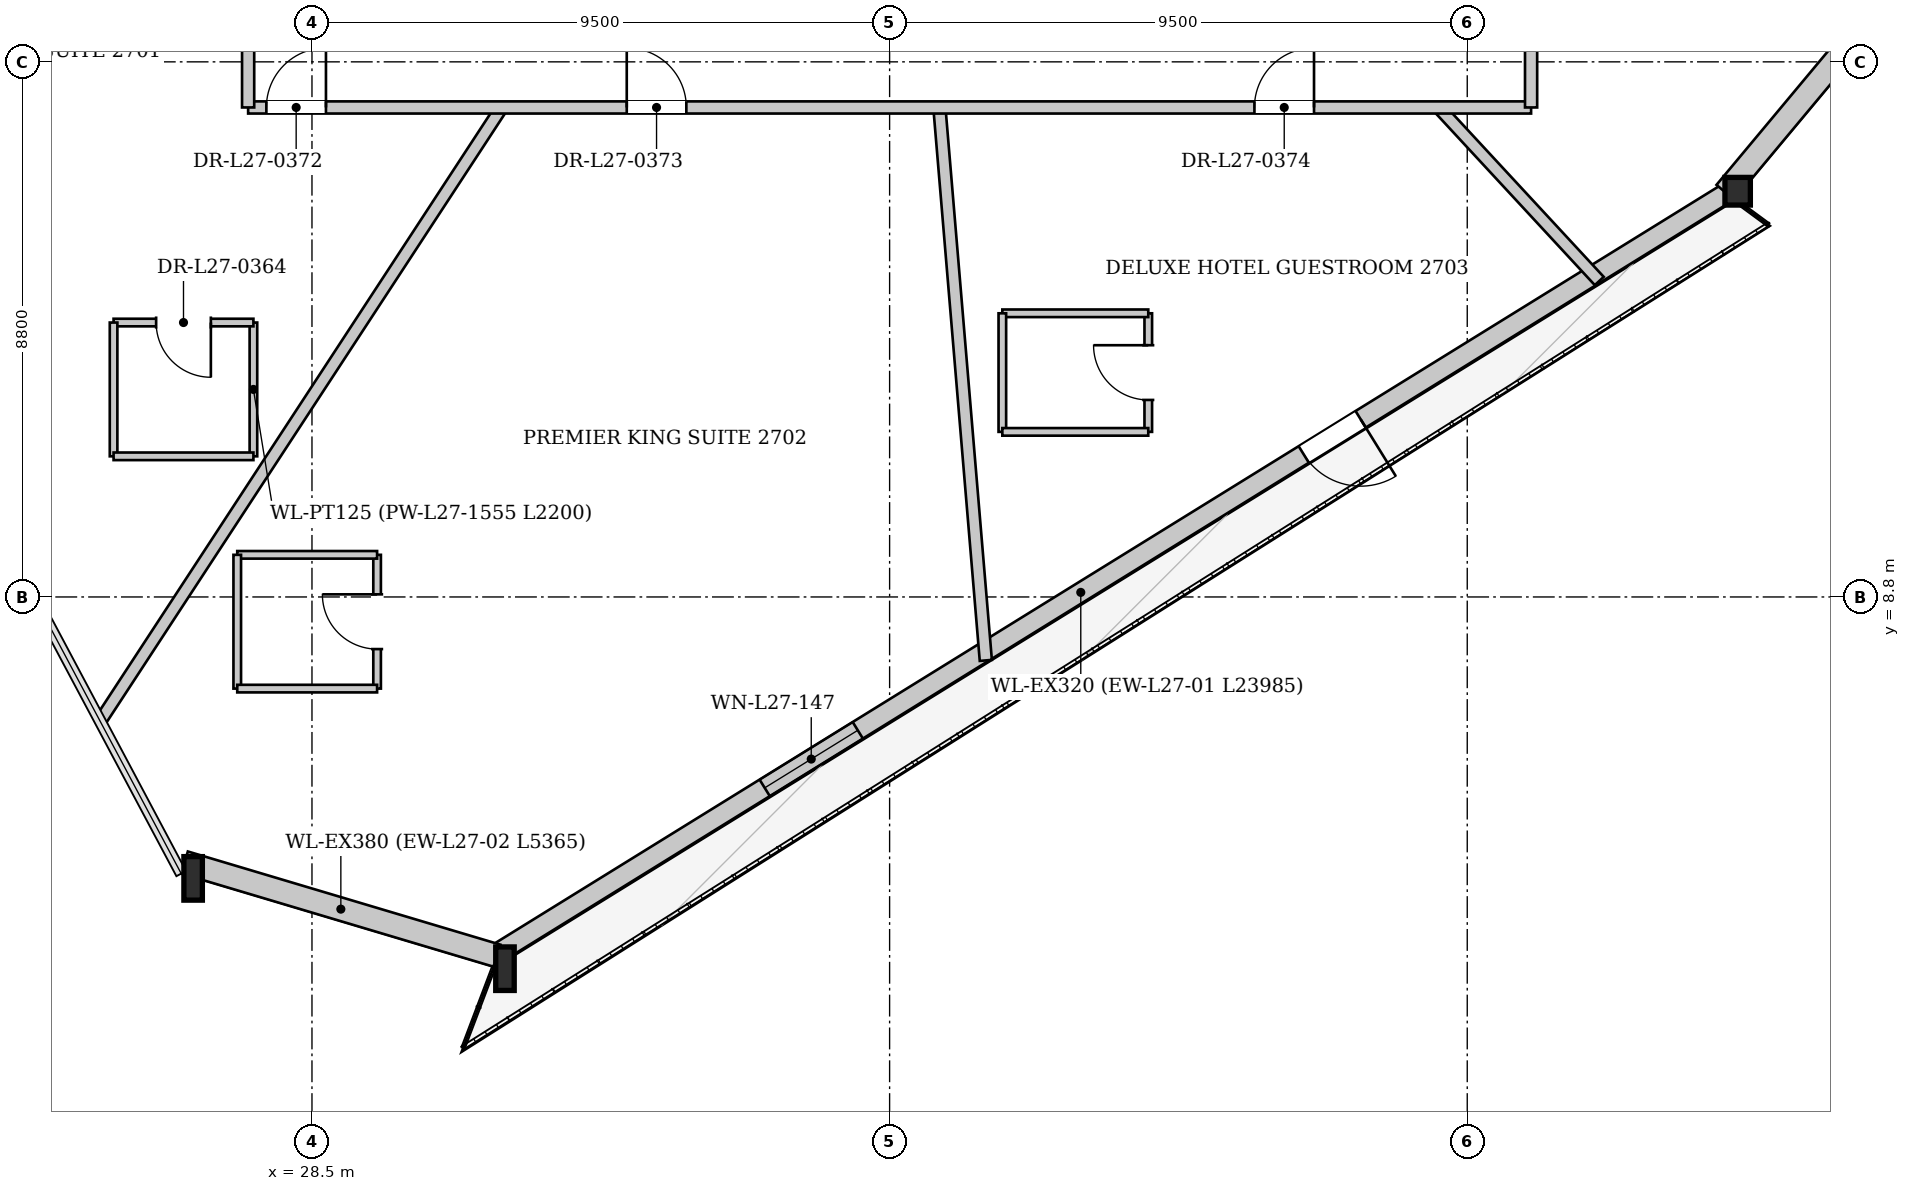
"""IFC4 building model, lengths in metres.
Left out: names, types, materials, properties, quantities, classifications, styles, units other than length and angle.
Written with IfcOpenShell. Run it as: python <this file> out.ifc"""

import sys

from ifc_helpers import new_model, si_unit, direction, frame, frame_2d, origin, origin_2d, place, context, subcontext, project, spatial, rectangle, i_section, extrude, source, transform, mapped, element, fill, save


model = new_model("IFC4")
c1 = context("Model", 3, precision=1e-05, world=origin(), true_north=direction((0.0, 1.0)))
c2 = subcontext(c1, "Body", "Model", "MODEL_VIEW")
j1 = project(units=[si_unit("LENGTHUNIT", "METRE"), si_unit("PLANEANGLEUNIT", "RADIAN")], contexts=[c1])
p1 = place(None, origin())
s1 = spatial("IfcSite", under=j1, at=p1, CompositionType="ELEMENT")
p2 = place(p1, origin())
s2 = spatial("IfcBuilding", under=s1, at=p2, CompositionType="ELEMENT")
p3 = place(p2, frame((0.0, 0.0, 105.7)))
s3 = spatial("IfcBuildingStorey", under=s2, at=p3, CompositionType="ELEMENT", Elevation=105.7)
m1 = source(origin(), c2, "Body", "SweptSolid", [
    extrude(i_section(OverallWidth=0.304, OverallDepth=0.716, WebThickness=0.021, FlangeThickness=0.04, at=origin_2d()), origin(), (0.0, 0.0, 1.0), 3.411),
])
p4 = place(p3, frame((26.35, 4.25, 0.0), z_axis=(0.114728514491, -0.045948662697, 0.992333657778), x_axis=(0.371790029716, 0.928316849898, 0.0)))
e1 = element("IfcColumn", 1, at=p4, inside=s3, PredefinedType="COLUMN", context=c2, shape_type="MappedRepresentation", body=[
    mapped(m1, transform((0.0, 0.0, 0.0), x_axis=(1.0, 0.0, 0.0), y_axis=(0.0, 1.0, 0.0), z_axis=(0.0, 0.0, 1.0), scale=1.0)),
])
m2 = source(origin(), c2, "Body", "SweptSolid", [
    extrude(i_section(OverallWidth=0.304, OverallDepth=0.716, WebThickness=0.021, FlangeThickness=0.04, at=origin_2d()), origin(), (0.0, 0.0, 1.0), 3.405),
])
p5 = place(p3, frame((31.491, 2.718, 0.0), z_axis=(0.107328170064, -0.018138962609, 0.994058168291), x_axis=(0.166641574591, 0.98601753819, 0.0)))
e2 = element("IfcColumn", 2, at=p5, inside=s3, PredefinedType="COLUMN", context=c2, shape_type="MappedRepresentation", body=[
    mapped(m2, transform((0.0, 0.0, 0.0), x_axis=(1.0, 0.0, 0.0), y_axis=(0.0, 1.0, 0.0), z_axis=(0.0, 0.0, 1.0), scale=1.0)),
])
m3 = source(origin(), c2, "Body", "SweptSolid", [
    extrude(i_section(OverallWidth=0.418, OverallDepth=0.455, WebThickness=0.038, FlangeThickness=0.059, at=origin_2d()), origin(), (0.0, 0.0, 1.0), 3.398),
])
p6 = place(p3, frame((51.891, 15.333, 0.0), z_axis=(0.033119577524, 0.08175722174, 0.996101827264), x_axis=(-0.926838869798, 0.375459331263, 0.0)))
e3 = element("IfcColumn", 3, at=p6, inside=s3, PredefinedType="COLUMN", context=c2, shape_type="MappedRepresentation", body=[
    mapped(m3, transform((0.0, 0.0, 0.0), x_axis=(1.0, 0.0, 0.0), y_axis=(0.0, 1.0, 0.0), z_axis=(0.0, 0.0, 1.0), scale=1.0)),
])
p7 = place(p3, frame((51.807, 15.469, 0.0), z_axis=(0.0, 0.0, 1.0), x_axis=(-0.85050085658, -0.525973661847, 0.0)))
e4 = element("IfcWall", 4, at=p7, inside=s3, PredefinedType="SOLIDWALL", context=c2, shape_type="SweptSolid", body=[
    extrude(rectangle(XDim=23.985, YDim=0.32, at=frame_2d((11.993, 0.0))), origin(), (0.0, 0.0, 1.0), 2.692),
])
p8 = place(p7, frame((7.125, 0.0, 0.0)))
e5 = element("IfcOpeningElement", 5, at=p8, cuts=e4, PredefinedType="OPENING", context=c2, shape_type="SweptSolid", body=[
    extrude(rectangle(XDim=1.1, YDim=2.3, at=frame_2d((0.55, 1.15))), frame((0.0, 0.17, 0.0), z_axis=(0.0, -1.0, 0.0), x_axis=(1.0, 0.0, 0.0)), (0.0, 0.0, 1.0), 0.34),
])
p9 = place(p7, frame((16.849, 0.0, 0.372)))
e6 = element("IfcOpeningElement", 6, at=p9, cuts=e4, PredefinedType="OPENING", context=c2, shape_type="SweptSolid", body=[
    extrude(rectangle(XDim=1.8, YDim=2.2, at=frame_2d((0.9, 1.1))), frame((0.0, 0.17, 0.0), z_axis=(0.0, -1.0, 0.0), x_axis=(1.0, 0.0, 0.0)), (0.0, 0.0, 1.0), 0.34),
])
p10 = place(p3, frame((31.546, 2.9, 0.0), z_axis=(0.0, 0.0, 1.0), x_axis=(-0.95832579707, 0.28567755717, 0.0)))
e7 = element("IfcWall", 7, at=p10, inside=s3, PredefinedType="SOLIDWALL", context=c2, shape_type="SweptSolid", body=[
    extrude(rectangle(XDim=5.365, YDim=0.38, at=frame_2d((2.683, 0.0))), origin(), (0.0, 0.0, 1.0), 2.692),
])
p11 = place(p3, frame((67.109, 33.873, 0.0), z_axis=(0.0, 0.0, 1.0), x_axis=(-0.640571779822, -0.767898297234, 0.0)))
e8 = element("IfcWall", 8, at=p11, inside=s3, PredefinedType="SOLIDWALL", context=c2, shape_type="SweptSolid", body=[
    extrude(rectangle(XDim=23.985, YDim=0.38, at=frame_2d((11.993, 0.0))), origin(), (0.0, 0.0, 1.0), 2.692),
])
p12 = place(p11, frame((5.616, 0.0, 0.322)))
e9 = element("IfcOpeningElement", 9, at=p12, cuts=e8, PredefinedType="OPENING", context=c2, shape_type="SweptSolid", body=[
    extrude(rectangle(XDim=2.2, YDim=2.25, at=frame_2d((1.1, 1.125))), frame((0.0, 0.2, 0.0), z_axis=(0.0, -1.0, 0.0), x_axis=(1.0, 0.0, 0.0)), (0.0, 0.0, 1.0), 0.4),
])
p13 = place(p11, frame((16.169, 0.0, 0.322)))
e10 = element("IfcOpeningElement", 10, at=p13, cuts=e8, PredefinedType="OPENING", context=c2, shape_type="SweptSolid", body=[
    extrude(rectangle(XDim=2.2, YDim=2.25, at=frame_2d((1.1, 1.125))), frame((0.0, 0.2, 0.0), z_axis=(0.0, -1.0, 0.0), x_axis=(1.0, 0.0, 0.0)), (0.0, 0.0, 1.0), 0.4),
])
p14 = place(p3, frame((31.62, 16.85, 0.0), z_axis=(0.0, 0.0, 1.0), x_axis=(-0.547573647932, -0.836757491804, 0.0)))
e11 = element("IfcWall", 11, at=p14, inside=s3, PredefinedType="PARTITIONING", context=c2, shape_type="SweptSolid", body=[
    extrude(rectangle(XDim=12.027, YDim=0.2, at=frame_2d((6.014, 0.0))), origin(), (0.0, 0.0, 1.0), 3.3),
])
p15 = place(p3, frame((38.819, 16.85, 0.0), z_axis=(0.0, 0.0, 1.0), x_axis=(0.083685335616, -0.996492230077, 0.0)))
e12 = element("IfcWall", 12, at=p15, inside=s3, PredefinedType="PARTITIONING", context=c2, shape_type="SweptSolid", body=[
    extrude(rectangle(XDim=9.125, YDim=0.2, at=frame_2d((4.563, 0.0))), origin(), (0.0, 0.0, 1.0), 3.3),
])
p16 = place(p3, frame((47.029, 16.85, 0.0), z_axis=(0.0, 0.0, 1.0), x_axis=(0.679439321048, -0.733731700974, 0.0)))
e13 = element("IfcWall", 13, at=p16, inside=s3, PredefinedType="PARTITIONING", context=c2, shape_type="SweptSolid", body=[
    extrude(rectangle(XDim=3.89, YDim=0.2, at=frame_2d((1.945, 0.0))), origin(), (0.0, 0.0, 1.0), 3.3),
])
p17 = place(p3, frame((27.537, 11.113, 0.0), z_axis=(0.0, 0.0, 1.0), x_axis=(0.0, 1.0, 0.0)))
e14 = element("IfcWall", 14, at=p17, inside=s3, PredefinedType="PARTITIONING", context=c2, shape_type="SweptSolid", body=[
    extrude(rectangle(XDim=2.2, YDim=0.125, at=frame_2d((1.1, 0.0))), origin(), (0.0, 0.0, 1.0), 3.3),
])
p18 = place(p3, frame((27.537, 13.313, 0.0), z_axis=(0.0, 0.0, 1.0), x_axis=(-1.0, 0.0, 0.0)))
e15 = element("IfcWall", 15, at=p18, inside=s3, PredefinedType="PARTITIONING", context=c2, shape_type="SweptSolid", body=[
    extrude(rectangle(XDim=2.3, YDim=0.125, at=frame_2d((1.15, 0.0))), origin(), (0.0, 0.0, 1.0), 3.3),
])
p19 = place(p18, frame((0.7, 0.0, 0.0)))
e16 = element("IfcOpeningElement", 16, at=p19, cuts=e15, PredefinedType="OPENING", context=c2, shape_type="SweptSolid", body=[
    extrude(rectangle(XDim=0.9, YDim=2.1, at=frame_2d((0.45, 1.05))), frame((0.0, 0.073, 0.0), z_axis=(0.0, -1.0, 0.0), x_axis=(1.0, 0.0, 0.0)), (0.0, 0.0, 1.0), 0.145),
])
p20 = place(p3, frame((25.237, 13.313, 0.0), z_axis=(0.0, 0.0, 1.0), x_axis=(0.0, -1.0, 0.0)))
e17 = element("IfcWall", 17, at=p20, inside=s3, PredefinedType="PARTITIONING", context=c2, shape_type="SweptSolid", body=[
    extrude(rectangle(XDim=2.2, YDim=0.125, at=frame_2d((1.1, 0.0))), origin(), (0.0, 0.0, 1.0), 3.3),
])
p21 = place(p3, frame((25.237, 11.113, 0.0), z_axis=(0.0, 0.0, 1.0), x_axis=(1.0, 0.0, 0.0)))
e18 = element("IfcWall", 18, at=p21, inside=s3, PredefinedType="PARTITIONING", context=c2, shape_type="SweptSolid", body=[
    extrude(rectangle(XDim=2.3, YDim=0.125, at=frame_2d((1.15, 0.0))), origin(), (0.0, 0.0, 1.0), 3.3),
])
p22 = place(p3, frame((29.571, 7.293, 0.0), z_axis=(0.0, 0.0, 1.0), x_axis=(0.0, 1.0, 0.0)))
e19 = element("IfcWall", 19, at=p22, inside=s3, PredefinedType="PARTITIONING", context=c2, shape_type="SweptSolid", body=[
    extrude(rectangle(XDim=2.2, YDim=0.125, at=frame_2d((1.1, 0.0))), origin(), (0.0, 0.0, 1.0), 2.795),
])
p23 = place(p22, frame((0.65, 0.0, 0.0)))
e20 = element("IfcOpeningElement", 20, at=p23, cuts=e19, PredefinedType="OPENING", context=c2, shape_type="SweptSolid", body=[
    extrude(rectangle(XDim=0.9, YDim=2.1, at=frame_2d((0.45, 1.05))), frame((0.0, 0.073, 0.0), z_axis=(0.0, -1.0, 0.0), x_axis=(1.0, 0.0, 0.0)), (0.0, 0.0, 1.0), 0.145),
])
p24 = place(p3, frame((29.571, 9.493, 0.0), z_axis=(0.0, 0.0, 1.0), x_axis=(-1.0, 0.0, 0.0)))
e21 = element("IfcWall", 21, at=p24, inside=s3, PredefinedType="PARTITIONING", context=c2, shape_type="SweptSolid", body=[
    extrude(rectangle(XDim=2.3, YDim=0.125, at=frame_2d((1.15, 0.0))), origin(), (0.0, 0.0, 1.0), 3.3),
])
p25 = place(p3, frame((27.271, 9.493, 0.0), z_axis=(0.0, 0.0, 1.0), x_axis=(0.0, -1.0, 0.0)))
e22 = element("IfcWall", 22, at=p25, inside=s3, PredefinedType="PARTITIONING", context=c2, shape_type="SweptSolid", body=[
    extrude(rectangle(XDim=2.2, YDim=0.125, at=frame_2d((1.1, 0.0))), origin(), (0.0, 0.0, 1.0), 3.3),
])
p26 = place(p3, frame((27.271, 7.293, 0.0), z_axis=(0.0, 0.0, 1.0), x_axis=(1.0, 0.0, 0.0)))
e23 = element("IfcWall", 23, at=p26, inside=s3, PredefinedType="PARTITIONING", context=c2, shape_type="SweptSolid", body=[
    extrude(rectangle(XDim=2.3, YDim=0.125, at=frame_2d((1.15, 0.0))), origin(), (0.0, 0.0, 1.0), 3.3),
])
p27 = place(p3, frame((42.254, 11.515, 0.0), z_axis=(0.0, 0.0, 1.0), x_axis=(0.0, 1.0, 0.0)))
e24 = element("IfcWall", 24, at=p27, inside=s3, PredefinedType="PARTITIONING", context=c2, shape_type="SweptSolid", body=[
    extrude(rectangle(XDim=1.95, YDim=0.125, at=frame_2d((0.975, 0.0))), origin(), (0.0, 0.0, 1.0), 3.3),
])
p28 = place(p27, frame((0.525, 0.0, 0.0)))
e25 = element("IfcOpeningElement", 25, at=p28, cuts=e24, PredefinedType="OPENING", context=c2, shape_type="SweptSolid", body=[
    extrude(rectangle(XDim=0.9, YDim=2.1, at=frame_2d((0.45, 1.05))), frame((0.0, 0.073, 0.0), z_axis=(0.0, -1.0, 0.0), x_axis=(1.0, 0.0, 0.0)), (0.0, 0.0, 1.0), 0.145),
])
p29 = place(p3, frame((42.254, 13.465, 0.0), z_axis=(0.0, 0.0, 1.0), x_axis=(-1.0, 0.0, 0.0)))
e26 = element("IfcWall", 26, at=p29, inside=s3, PredefinedType="PARTITIONING", context=c2, shape_type="SweptSolid", body=[
    extrude(rectangle(XDim=2.4, YDim=0.125, at=frame_2d((1.2, 0.0))), origin(), (0.0, 0.0, 1.0), 3.045),
])
p30 = place(p3, frame((39.854, 13.465, 0.0), z_axis=(0.0, 0.0, 1.0), x_axis=(0.0, -1.0, 0.0)))
e27 = element("IfcWall", 27, at=p30, inside=s3, PredefinedType="PARTITIONING", context=c2, shape_type="SweptSolid", body=[
    extrude(rectangle(XDim=1.95, YDim=0.125, at=frame_2d((0.975, 0.0))), origin(), (0.0, 0.0, 1.0), 3.3),
])
p31 = place(p3, frame((39.854, 11.515, 0.0), z_axis=(0.0, 0.0, 1.0), x_axis=(1.0, 0.0, 0.0)))
e28 = element("IfcWall", 28, at=p31, inside=s3, PredefinedType="PARTITIONING", context=c2, shape_type="SweptSolid", body=[
    extrude(rectangle(XDim=2.4, YDim=0.125, at=frame_2d((1.2, 0.0))), origin(), (0.0, 0.0, 1.0), 3.3),
])
p32 = place(p3, frame((27.45, 16.85, 0.0), z_axis=(0.0, 0.0, 1.0), x_axis=(1.0, 0.0, 0.0)))
e29 = element("IfcWall", 29, at=p32, inside=s3, PredefinedType="PARTITIONING", context=c2, shape_type="SweptSolid", body=[
    extrude(rectangle(XDim=21.1, YDim=0.2, at=frame_2d((10.55, 0.0))), origin(), (0.0, 0.0, 1.0), 3.045),
])
p33 = place(p32, frame((0.3, 0.0, 0.0)))
e30 = element("IfcOpeningElement", 30, at=p33, cuts=e29, PredefinedType="OPENING", context=c2, shape_type="SweptSolid", body=[
    extrude(rectangle(XDim=0.98, YDim=2.15, at=frame_2d((0.49, 1.075))), frame((0.0, 0.11, 0.0), z_axis=(0.0, -1.0, 0.0), x_axis=(1.0, 0.0, 0.0)), (0.0, 0.0, 1.0), 0.22),
])
p34 = place(p32, frame((6.227, 0.0, 0.0)))
e31 = element("IfcOpeningElement", 31, at=p34, cuts=e29, PredefinedType="OPENING", context=c2, shape_type="SweptSolid", body=[
    extrude(rectangle(XDim=0.98, YDim=2.15, at=frame_2d((0.49, 1.075))), frame((0.0, 0.11, 0.0), z_axis=(0.0, -1.0, 0.0), x_axis=(1.0, 0.0, 0.0)), (0.0, 0.0, 1.0), 0.22),
])
p35 = place(p32, frame((16.55, 0.0, 0.0)))
e32 = element("IfcOpeningElement", 32, at=p35, cuts=e29, PredefinedType="OPENING", context=c2, shape_type="SweptSolid", body=[
    extrude(rectangle(XDim=0.98, YDim=2.15, at=frame_2d((0.49, 1.075))), frame((0.0, 0.11, 0.0), z_axis=(0.0, -1.0, 0.0), x_axis=(1.0, 0.0, 0.0)), (0.0, 0.0, 1.0), 0.22),
])
p36 = place(p3, frame((27.45, 16.85, 0.0), z_axis=(0.0, 0.0, 1.0), x_axis=(0.0, 1.0, 0.0)))
e33 = element("IfcWall", 33, at=p36, inside=s3, PredefinedType="PARTITIONING", context=c2, shape_type="SweptSolid", body=[
    extrude(rectangle(XDim=19.5, YDim=0.2, at=frame_2d((9.75, 0.0))), origin(), (0.0, 0.0, 1.0), 3.3),
])
p37 = place(p36, frame((16.938, 0.0, 0.0)))
e34 = element("IfcOpeningElement", 34, at=p37, cuts=e33, PredefinedType="OPENING", context=c2, shape_type="SweptSolid", body=[
    extrude(rectangle(XDim=0.98, YDim=2.15, at=frame_2d((0.49, 1.075))), frame((0.0, 0.11, 0.0), z_axis=(0.0, -1.0, 0.0), x_axis=(1.0, 0.0, 0.0)), (0.0, 0.0, 1.0), 0.22),
])
p38 = place(p36, frame((9.597, 0.0, 0.0)))
e35 = element("IfcOpeningElement", 35, at=p38, cuts=e33, PredefinedType="OPENING", context=c2, shape_type="SweptSolid", body=[
    extrude(rectangle(XDim=0.98, YDim=2.15, at=frame_2d((0.49, 1.075))), frame((0.0, 0.11, 0.0), z_axis=(0.0, -1.0, 0.0), x_axis=(1.0, 0.0, 0.0)), (0.0, 0.0, 1.0), 0.22),
])
p39 = place(p3, frame((48.55, 16.85, 0.0), z_axis=(0.0, 0.0, 1.0), x_axis=(0.0, 1.0, 0.0)))
e36 = element("IfcWall", 36, at=p39, inside=s3, PredefinedType="PARTITIONING", context=c2, shape_type="SweptSolid", body=[
    extrude(rectangle(XDim=19.5, YDim=0.2, at=frame_2d((9.75, 0.0))), origin(), (0.0, 0.0, 1.0), 3.3),
])
p40 = place(p39, frame((1.869, 0.0, 0.0)))
e37 = element("IfcOpeningElement", 37, at=p40, cuts=e36, PredefinedType="OPENING", context=c2, shape_type="SweptSolid", body=[
    extrude(rectangle(XDim=0.98, YDim=2.15, at=frame_2d((0.49, 1.075))), frame((0.0, 0.11, 0.0), z_axis=(0.0, -1.0, 0.0), x_axis=(1.0, 0.0, 0.0)), (0.0, 0.0, 1.0), 0.22),
])
p41 = place(p39, frame((11.325, 0.0, 0.0)))
e38 = element("IfcOpeningElement", 38, at=p41, cuts=e36, PredefinedType="OPENING", context=c2, shape_type="SweptSolid", body=[
    extrude(rectangle(XDim=0.98, YDim=2.15, at=frame_2d((0.49, 1.075))), frame((0.0, 0.11, 0.0), z_axis=(0.0, -1.0, 0.0), x_axis=(1.0, 0.0, 0.0)), (0.0, 0.0, 1.0), 0.22),
])
m4 = source(origin(), c2, "Body", "SweptSolid", [
    extrude(rectangle(XDim=1.1, YDim=2.3, at=frame_2d((0.55, 1.15))), frame((0.0, 0.025, 0.0), z_axis=(0.0, -1.0, 0.0), x_axis=(1.0, 0.0, 0.0)), (0.0, 0.0, 1.0), 0.05),
])
p42 = place(p8, origin())
e39 = element("IfcDoor", 39, at=p42, inside=s3, OperationType="SINGLE_SWING_LEFT", PredefinedType="DOOR", context=c2, shape_type="MappedRepresentation", body=[
    mapped(m4, transform((0.0, 0.0, 0.0), x_axis=(1.0, 0.0, 0.0), y_axis=(0.0, 1.0, 0.0), z_axis=(0.0, 0.0, 1.0), scale=1.0)),
])
fill(e5, e39)
m5 = source(origin(), c2, "Body", "SweptSolid", [
    extrude(rectangle(XDim=1.8, YDim=2.2, at=frame_2d((0.9, 1.1))), frame((0.0, 0.03, 0.0), z_axis=(0.0, -1.0, 0.0), x_axis=(1.0, 0.0, 0.0)), (0.0, 0.0, 1.0), 0.06),
])
p43 = place(p9, origin())
e40 = element("IfcWindow", 40, at=p43, inside=s3, PartitioningType="SINGLE_PANEL", PredefinedType="WINDOW", context=c2, shape_type="MappedRepresentation", body=[
    mapped(m5, transform((0.0, 0.0, 0.0), x_axis=(1.0, 0.0, 0.0), y_axis=(0.0, 1.0, 0.0), z_axis=(0.0, 0.0, 1.0), scale=1.0)),
])
fill(e6, e40)
m6 = source(origin(), c2, "Body", "SweptSolid", [
    extrude(rectangle(XDim=0.9, YDim=2.1, at=frame_2d((0.45, 1.05))), frame((0.0, 0.025, 0.0), z_axis=(0.0, -1.0, 0.0), x_axis=(1.0, 0.0, 0.0)), (0.0, 0.0, 1.0), 0.05),
])
p44 = place(p19, origin())
e41 = element("IfcDoor", 41, at=p44, inside=s3, OperationType="SINGLE_SWING_LEFT", PredefinedType="DOOR", context=c2, shape_type="MappedRepresentation", body=[
    mapped(m6, transform((0.0, 0.0, 0.0), x_axis=(1.0, 0.0, 0.0), y_axis=(0.0, 1.0, 0.0), z_axis=(0.0, 0.0, 1.0), scale=1.0)),
])
fill(e16, e41)
p45 = place(p23, origin())
e42 = element("IfcDoor", 42, at=p45, inside=s3, OperationType="SINGLE_SWING_RIGHT", PredefinedType="DOOR", context=c2, shape_type="MappedRepresentation", body=[
    mapped(m6, transform((0.0, 0.0, 0.0), x_axis=(1.0, 0.0, 0.0), y_axis=(0.0, 1.0, 0.0), z_axis=(0.0, 0.0, 1.0), scale=1.0)),
])
fill(e20, e42)
p46 = place(p28, origin())
e43 = element("IfcDoor", 43, at=p46, inside=s3, OperationType="SINGLE_SWING_RIGHT", PredefinedType="DOOR", context=c2, shape_type="MappedRepresentation", body=[
    mapped(m6, transform((0.0, 0.0, 0.0), x_axis=(1.0, 0.0, 0.0), y_axis=(0.0, 1.0, 0.0), z_axis=(0.0, 0.0, 1.0), scale=1.0)),
])
fill(e25, e43)
m7 = source(origin(), c2, "Body", "SweptSolid", [
    extrude(rectangle(XDim=0.98, YDim=2.15, at=frame_2d((0.49, 1.075))), frame((0.0, 0.025, 0.0), z_axis=(0.0, -1.0, 0.0), x_axis=(1.0, 0.0, 0.0)), (0.0, 0.0, 1.0), 0.05),
])
p47 = place(p33, origin())
e44 = element("IfcDoor", 44, at=p47, inside=s3, OperationType="SINGLE_SWING_RIGHT", PredefinedType="DOOR", context=c2, shape_type="MappedRepresentation", body=[
    mapped(m7, transform((0.0, 0.0, 0.0), x_axis=(1.0, 0.0, 0.0), y_axis=(0.0, 1.0, 0.0), z_axis=(0.0, 0.0, 1.0), scale=1.0)),
])
fill(e30, e44)
p48 = place(p34, origin())
e45 = element("IfcDoor", 45, at=p48, inside=s3, OperationType="SINGLE_SWING_LEFT", PredefinedType="DOOR", context=c2, shape_type="MappedRepresentation", body=[
    mapped(m7, transform((0.0, 0.0, 0.0), x_axis=(1.0, 0.0, 0.0), y_axis=(0.0, 1.0, 0.0), z_axis=(0.0, 0.0, 1.0), scale=1.0)),
])
fill(e31, e45)
p49 = place(p35, origin())
e46 = element("IfcDoor", 46, at=p49, inside=s3, OperationType="SINGLE_SWING_RIGHT", PredefinedType="DOOR", context=c2, shape_type="MappedRepresentation", body=[
    mapped(m7, transform((0.0, 0.0, 0.0), x_axis=(1.0, 0.0, 0.0), y_axis=(0.0, 1.0, 0.0), z_axis=(0.0, 0.0, 1.0), scale=1.0)),
])
fill(e32, e46)
save(model, sys.argv[1])
